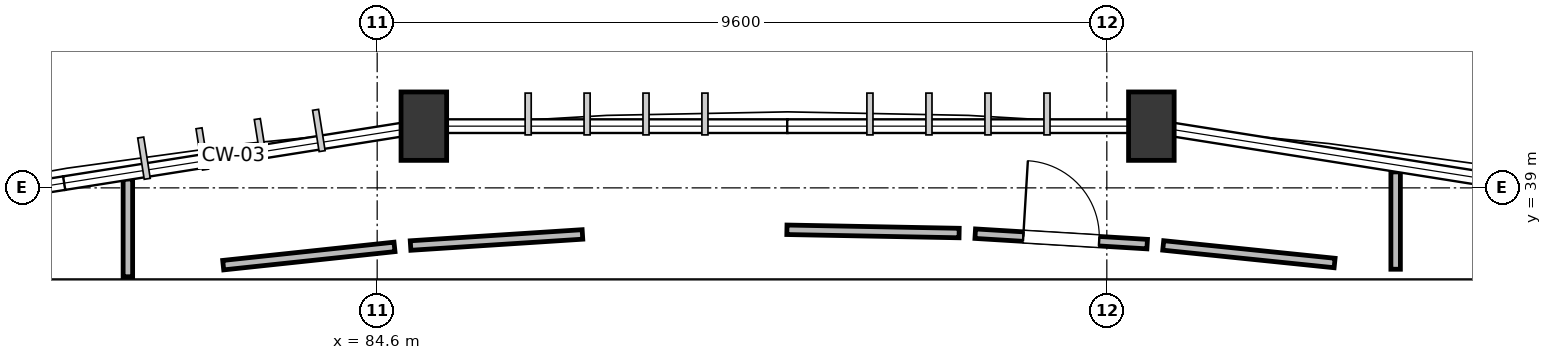
"""IFC4 building model, lengths in metres.
Left out: names, types, materials, properties, quantities, classifications, styles, units other than length and angle.
Written with IfcOpenShell. Run it as: python <this file> out.ifc"""

import sys

from ifc_helpers import new_model, si_unit, direction, frame, frame_2d, origin, origin_2d, place, context, subcontext, project, spatial, rectangle, extrude, element, fill, save


model = new_model("IFC4")
c1 = context("Model", 3, precision=1e-05, world=origin(), true_north=direction((0.0, 1.0)))
c2 = subcontext(c1, "Body", "Model", "MODEL_VIEW")
j1 = project(units=[si_unit("LENGTHUNIT", "METRE"), si_unit("PLANEANGLEUNIT", "RADIAN")], contexts=[c1])
p1 = place(None, origin())
s1 = spatial("IfcSite", under=j1, at=p1, CompositionType="ELEMENT")
p2 = place(p1, origin())
s2 = spatial("IfcBuilding", under=s1, at=p2, CompositionType="ELEMENT")
p3 = place(p2, frame((0.0, 0.0, 19.5)))
s3 = spatial("IfcBuildingStorey", under=s2, at=p3, CompositionType="ELEMENT", Elevation=19.5)
for number, where, z_axis, x_axis in (
    (1, (85.214, 39.812, 0.0), (0.0, 0.0, 1.0), (1.0, 0.0, 0.0)),
    (2, (94.786, 39.812, 0.0), (0.0, 0.0, 1.0), (1.0, 0.0, 0.0)),
):
    element("IfcColumn", number, at=place(p3, frame(where, z_axis=z_axis, x_axis=x_axis)), inside=s3, PredefinedType="COLUMN", context=c2, shape_type="SweptSolid", body=[
        extrude(rectangle(XDim=0.6, YDim=0.9, at=origin_2d()), origin(), (0.0, 0.0, 1.0), 4.5),
    ])
p4 = place(p3, frame((82.574, 37.983, 0.0), z_axis=(0.0, 0.0, 1.0), x_axis=(0.994366469197, 0.105996815696, 0.0)))
e3 = element("IfcWall", 3, at=p4, inside=s3, PredefinedType="PARTITIONING", context=c2, shape_type="SweptSolid", body=[
    extrude(rectangle(XDim=2.266, YDim=0.125, at=frame_2d((1.133, 0.0))), origin(), (0.0, 0.0, 1.0), 3.405),
])
p5 = place(p3, frame((85.039, 38.241, 0.0), z_axis=(0.0, 0.0, 1.0), x_axis=(0.997915696942, 0.064531091706, 0.0)))
e4 = element("IfcWall", 4, at=p5, inside=s3, PredefinedType="PARTITIONING", context=c2, shape_type="SweptSolid", body=[
    extrude(rectangle(XDim=2.266, YDim=0.125, at=frame_2d((1.133, 0.0))), origin(), (0.0, 0.0, 1.0), 3.405),
])
p6 = place(p3, frame((89.991, 38.448, 0.0), z_axis=(0.0, 0.0, 1.0), x_axis=(0.999822278173, -0.018852375679, 0.0)))
e5 = element("IfcWall", 5, at=p6, inside=s3, PredefinedType="PARTITIONING", context=c2, shape_type="SweptSolid", body=[
    extrude(rectangle(XDim=2.266, YDim=0.125, at=frame_2d((1.133, 0.0))), origin(), (0.0, 0.0, 1.0), 4.18),
])
p7 = place(p3, frame((92.469, 38.397, 0.0), z_axis=(0.0, 0.0, 1.0), x_axis=(0.998159220571, -0.060647921561, 0.0)))
e6 = element("IfcWall", 6, at=p7, inside=s3, PredefinedType="PARTITIONING", context=c2, shape_type="SweptSolid", body=[
    extrude(rectangle(XDim=2.266, YDim=0.125, at=frame_2d((1.133, 0.0))), origin(), (0.0, 0.0, 1.0), 3.405),
])
p8 = place(p7, frame((0.633, 0.0, 0.0)))
e7 = element("IfcOpeningElement", 7, at=p8, cuts=e6, PredefinedType="OPENING", context=c2, shape_type="SweptSolid", body=[
    extrude(rectangle(XDim=1.0, YDim=2.15, at=frame_2d((0.5, 1.075))), frame((0.0, 0.073, 0.0), z_axis=(0.0, -1.0, 0.0), x_axis=(1.0, 0.0, 0.0)), (0.0, 0.0, 1.0), 0.145),
])
p9 = place(p3, frame((94.942, 38.243, 0.0), z_axis=(0.0, 0.0, 1.0), x_axis=(0.994772464136, -0.102116328749, 0.0)))
e8 = element("IfcWall", 8, at=p9, inside=s3, PredefinedType="PARTITIONING", context=c2, shape_type="SweptSolid", body=[
    extrude(rectangle(XDim=2.267, YDim=0.125, at=frame_2d((1.133, 0.0))), origin(), (0.0, 0.0, 1.0), 3.405),
])
p10 = place(p3, frame((81.32, 37.831, 0.0), z_axis=(0.0, 0.0, 1.0), x_axis=(0.0, 1.0, 0.0)))
e9 = element("IfcWall", 9, at=p10, inside=s3, PredefinedType="PARTITIONING", context=c2, shape_type="SweptSolid", body=[
    extrude(rectangle(XDim=1.286, YDim=0.125, at=frame_2d((0.643, 0.0))), origin(), (0.0, 0.0, 1.0), 3.405),
])
p11 = place(p3, frame((98.0, 37.929, 0.0), z_axis=(0.0, 0.0, 1.0), x_axis=(0.0, 1.0, 0.0)))
e10 = element("IfcWall", 10, at=p11, inside=s3, PredefinedType="PARTITIONING", context=c2, shape_type="SweptSolid", body=[
    extrude(rectangle(XDim=1.281, YDim=0.125, at=frame_2d((0.64, 0.0))), origin(), (0.0, 0.0, 1.0), 3.405),
])
p12 = place(p8, origin())
e11 = element("IfcDoor", 11, at=p12, inside=s3, OperationType="SINGLE_SWING_LEFT", PredefinedType="DOOR", context=c2, shape_type="SweptSolid", body=[
    extrude(rectangle(XDim=1.0, YDim=2.15, at=frame_2d((0.5, 1.075))), frame((0.0, 0.025, 0.0), z_axis=(0.0, -1.0, 0.0), x_axis=(1.0, 0.0, 0.0)), (0.0, 0.0, 1.0), 0.05),
])
fill(e7, e11)
save(model, sys.argv[1])
